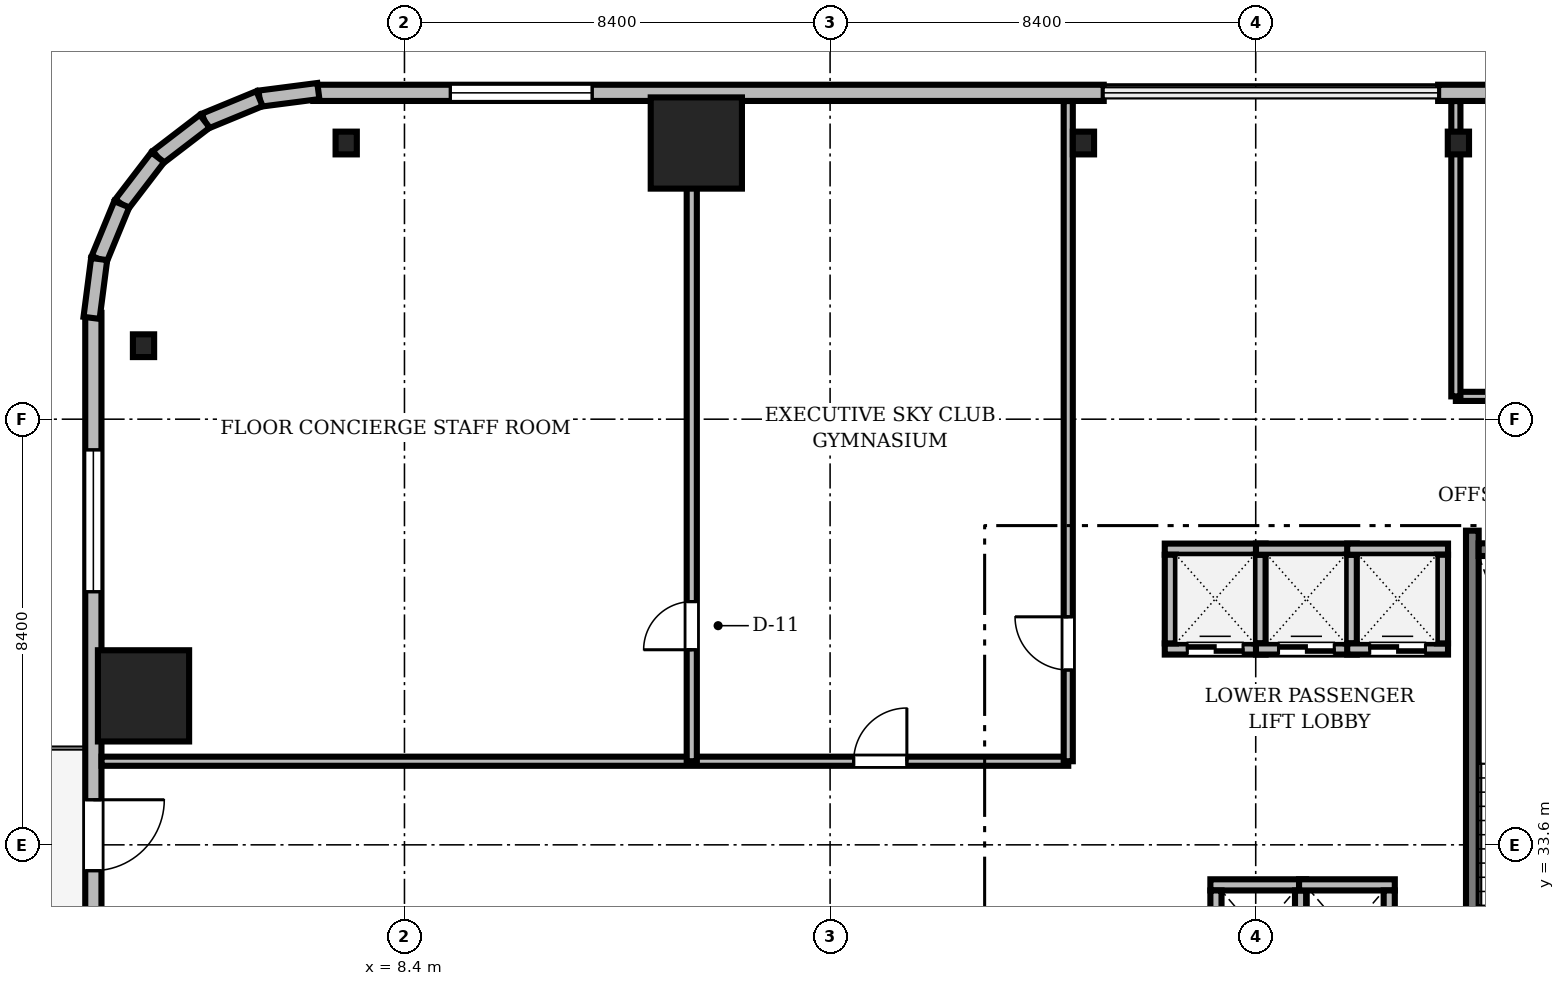
"""IFC4 building model, lengths in metres.
Left out: names, types, materials, properties, quantities, classifications, styles, units other than length and angle.
Written with IfcOpenShell. Run it as: python <this file> out.ifc"""

import sys

from ifc_helpers import new_model, si_unit, direction, frame, frame_2d, origin, origin_2d, place, context, subcontext, project, spatial, rectangle, i_section, extrude, source, transform, mapped, element, fill, save


model = new_model("IFC4")
c1 = context("Model", 3, precision=1e-05, world=origin(), true_north=direction((0.0, 1.0)))
c2 = subcontext(c1, "Body", "Model", "MODEL_VIEW")
j1 = project(units=[si_unit("LENGTHUNIT", "METRE"), si_unit("PLANEANGLEUNIT", "RADIAN")], contexts=[c1])
p1 = place(None, origin())
s1 = spatial("IfcSite", under=j1, at=p1, CompositionType="ELEMENT")
p2 = place(p1, origin())
s2 = spatial("IfcBuilding", under=s1, at=p2, CompositionType="ELEMENT")
p3 = place(p2, frame((0.0, 0.0, 56.8)))
s3 = spatial("IfcBuildingStorey", under=s2, at=p3, CompositionType="ELEMENT", Elevation=56.8)
m1 = source(origin(), c2, "Body", "SweptSolid", [
    extrude(rectangle(XDim=1.8, YDim=1.8, at=origin_2d()), origin(), (0.0, 0.0, 1.0), 3.41),
])
for number, where, z_axis, x_axis in (
    (1, (14.16, 47.45, 0.0), (0.0, 0.0, 1.0), (1.0, 0.0, 0.0)),
    (2, (3.25, 36.54, 0.0), (0.0, 0.0, 1.0), (1.0, 0.0, 0.0)),
):
    element("IfcColumn", number, at=place(p3, frame(where, z_axis=z_axis, x_axis=x_axis)), inside=s3, PredefinedType="COLUMN", context=c2, shape_type="MappedRepresentation", body=[
        mapped(m1, transform((0.0, 0.0, 0.0), scale=1.0)),
    ])
m2 = source(origin(), c2, "Body", "SweptSolid", [
    extrude(i_section(OverallWidth=0.419, OverallDepth=0.449, WebThickness=0.031, FlangeThickness=0.048, FilletRadius=0.015, at=origin_2d()), origin(), (0.0, 0.0, 1.0), 3.41),
])
for number, where, z_axis, x_axis in (
    (3, (29.2, 47.45, 0.0), (0.0, 0.0, 1.0), (1.0, 0.0, 0.0)),
    (4, (21.8, 47.45, 0.0), (0.0, 0.0, 1.0), (1.0, 0.0, 0.0)),
    (5, (7.25, 47.45, 0.0), (0.0, 0.0, 1.0), (1.0, 0.0, 0.0)),
    (6, (3.25, 43.45, 0.0), (0.0, 0.0, 1.0), (1.0, 0.0, 0.0)),
):
    element("IfcColumn", number, at=place(p3, frame(where, z_axis=z_axis, x_axis=x_axis)), inside=s3, PredefinedType="COLUMN", context=c2, shape_type="MappedRepresentation", body=[
        mapped(m2, transform((0.0, 0.0, 0.0), scale=1.0)),
    ])
m3 = source(origin(), c2, "Body", "SweptSolid", [
    extrude(rectangle(XDim=15.6, YDim=0.32, at=frame_2d((7.8, 0.0))), origin(), (0.0, 0.0, 1.0), 3.41),
])
p4 = place(p3, frame((44.4, 48.44, 0.0), z_axis=(0.0, 0.0, 1.0), x_axis=(-1.0, 0.0, 0.0)))
e7 = element("IfcWall", 7, at=p4, inside=s3, PredefinedType="SOLIDWALL", context=c2, shape_type="MappedRepresentation", body=[
    mapped(m3, transform((0.0, 0.0, 0.0), scale=1.0)),
])
m4 = source(origin(), c2, "Body", "SweptSolid", [
    extrude(rectangle(XDim=1.4, YDim=2.3, at=frame_2d((0.7, 1.15))), frame((0.0, 0.17, 0.0), z_axis=(0.0, -1.0, 0.0), x_axis=(1.0, 0.0, 0.0)), (0.0, 0.0, 1.0), 0.34),
])
p5 = place(p4, frame((9.61, 0.0, 0.0)))
e8 = element("IfcOpeningElement", 8, at=p5, cuts=e7, PredefinedType="OPENING", context=c2, shape_type="MappedRepresentation", body=[
    mapped(m4, transform((0.0, 0.0, 0.0), scale=1.0)),
])
m5 = source(origin(), c2, "Body", "SweptSolid", [
    extrude(rectangle(XDim=2.8, YDim=2.4, at=frame_2d((1.4, 1.2))), frame((0.0, 0.17, 0.0), z_axis=(0.0, -1.0, 0.0), x_axis=(1.0, 0.0, 0.0)), (0.0, 0.0, 1.0), 0.34),
])
p6 = place(p4, frame((2.705, 0.0, 0.72)))
e9 = element("IfcOpeningElement", 9, at=p6, cuts=e7, PredefinedType="OPENING", context=c2, shape_type="MappedRepresentation", body=[
    mapped(m5, transform((0.0, 0.0, 0.0), scale=1.0)),
])
p7 = place(p3, frame((22.2, 48.44, 0.0), z_axis=(0.0, 0.0, 1.0), x_axis=(-1.0, 0.0, 0.0)))
e10 = element("IfcWall", 10, at=p7, inside=s3, PredefinedType="SOLIDWALL", context=c2, shape_type="MappedRepresentation", body=[
    mapped(m3, transform((0.0, 0.0, 0.0), scale=1.0)),
])
p8 = place(p7, frame((10.095, 0.0, 0.72)))
e11 = element("IfcOpeningElement", 11, at=p8, cuts=e10, PredefinedType="OPENING", context=c2, shape_type="MappedRepresentation", body=[
    mapped(m5, transform((0.0, 0.0, 0.0), scale=1.0)),
])
m6 = source(origin(), c2, "Body", "SweptSolid", [
    extrude(rectangle(XDim=15.6, YDim=0.32, at=frame_2d((7.8, 0.0))), origin(), (0.0, 0.0, 1.0), 3.41),
])
p9 = place(p3, frame((2.26, 44.1, 0.0), z_axis=(0.0, 0.0, 1.0), x_axis=(0.0, -1.0, 0.0)))
e12 = element("IfcWall", 12, at=p9, inside=s3, PredefinedType="SOLIDWALL", context=c2, shape_type="MappedRepresentation", body=[
    mapped(m6, transform((0.0, 0.0, 0.0), scale=1.0)),
])
p10 = place(p9, frame((9.61, 0.0, 0.0)))
e13 = element("IfcOpeningElement", 13, at=p10, cuts=e12, PredefinedType="OPENING", context=c2, shape_type="MappedRepresentation", body=[
    mapped(m4, transform((0.0, 0.0, 0.0), scale=1.0)),
])
p11 = place(p9, frame((2.705, 0.0, 0.72)))
e14 = element("IfcOpeningElement", 14, at=p11, cuts=e12, PredefinedType="OPENING", context=c2, shape_type="MappedRepresentation", body=[
    mapped(m5, transform((0.0, 0.0, 0.0), scale=1.0)),
])
m7 = source(origin(), c2, "Body", "SweptSolid", [
    extrude(rectangle(XDim=1.17, YDim=0.32, at=frame_2d((0.585, 0.0))), origin(), (0.0, 0.0, 1.0), 3.41),
])
p12 = place(p3, frame((6.7, 48.476, 0.0), z_axis=(0.0, 0.0, 1.0), x_axis=(-0.991735963317, -0.128295670475, 0.0)))
e15 = element("IfcWall", 15, at=p12, inside=s3, PredefinedType="SOLIDWALL", context=c2, shape_type="MappedRepresentation", body=[
    mapped(m7, transform((0.0, 0.0, 0.0), scale=1.0)),
])
m8 = source(origin(), c2, "Body", "SweptSolid", [
    extrude(rectangle(XDim=1.169, YDim=0.32, at=frame_2d((0.584, 0.0))), origin(), (0.0, 0.0, 1.0), 3.41),
])
p13 = place(p3, frame((5.54, 48.325, 0.0), z_axis=(0.0, 0.0, 1.0), x_axis=(-0.924552646638, -0.381054331552, 0.0)))
e16 = element("IfcWall", 16, at=p13, inside=s3, PredefinedType="SOLIDWALL", context=c2, shape_type="MappedRepresentation", body=[
    mapped(m8, transform((0.0, 0.0, 0.0), scale=1.0)),
])
m9 = source(origin(), c2, "Body", "SweptSolid", [
    extrude(rectangle(XDim=1.169, YDim=0.32, at=frame_2d((0.584, 0.0))), origin(), (0.0, 0.0, 1.0), 3.41),
])
p14 = place(p3, frame((4.459, 47.88, 0.0), z_axis=(0.0, 0.0, 1.0), x_axis=(-0.793663520347, -0.608356981114, 0.0)))
e17 = element("IfcWall", 17, at=p14, inside=s3, PredefinedType="SOLIDWALL", context=c2, shape_type="MappedRepresentation", body=[
    mapped(m9, transform((0.0, 0.0, 0.0), scale=1.0)),
])
m10 = source(origin(), c2, "Body", "SweptSolid", [
    extrude(rectangle(XDim=1.169, YDim=0.32, at=frame_2d((0.584, 0.0))), origin(), (0.0, 0.0, 1.0), 3.41),
])
p15 = place(p3, frame((3.531, 47.169, 0.0), z_axis=(0.0, 0.0, 1.0), x_axis=(-0.608387696831, -0.793639975269, 0.0)))
e18 = element("IfcWall", 18, at=p15, inside=s3, PredefinedType="SOLIDWALL", context=c2, shape_type="MappedRepresentation", body=[
    mapped(m10, transform((0.0, 0.0, 0.0), scale=1.0)),
])
p16 = place(p3, frame((2.82, 46.241, 0.0), z_axis=(0.0, 0.0, 1.0), x_axis=(-0.381054331552, -0.924552646638, 0.0)))
e19 = element("IfcWall", 19, at=p16, inside=s3, PredefinedType="SOLIDWALL", context=c2, shape_type="MappedRepresentation", body=[
    mapped(m8, transform((0.0, 0.0, 0.0), scale=1.0)),
])
p17 = place(p3, frame((2.375, 45.16, 0.0), z_axis=(0.0, 0.0, 1.0), x_axis=(-0.128295670475, -0.991735963317, 0.0)))
e20 = element("IfcWall", 20, at=p17, inside=s3, PredefinedType="SOLIDWALL", context=c2, shape_type="MappedRepresentation", body=[
    mapped(m7, transform((0.0, 0.0, 0.0), scale=1.0)),
])
m11 = source(origin(), c2, "Body", "SweptSolid", [
    extrude(rectangle(XDim=9.15, YDim=0.25, at=frame_2d((4.575, 0.0))), origin(), (0.0, 0.0, 1.0), 3.45),
])
p18 = place(p3, frame((29.475, 30.65, 0.0), z_axis=(0.0, 0.0, 1.0), x_axis=(0.0, 1.0, 0.0)))
e21 = element("IfcWall", 21, at=p18, inside=s3, PredefinedType="SOLIDWALL", context=c2, shape_type="MappedRepresentation", body=[
    mapped(m11, transform((0.0, 0.0, 0.0), scale=1.0)),
])
m12 = source(origin(), c2, "Body", "SweptSolid", [
    extrude(rectangle(XDim=3.15, YDim=0.25, at=frame_2d((1.575, 0.0))), origin(), (0.0, 0.0, 1.0), 3.45),
])
p19 = place(p3, frame((29.6, 39.425, 0.0), z_axis=(0.0, 0.0, 1.0), x_axis=(1.0, 0.0, 0.0)))
e22 = element("IfcWall", 22, at=p19, inside=s3, PredefinedType="SOLIDWALL", context=c2, shape_type="MappedRepresentation", body=[
    mapped(m12, transform((0.0, 0.0, 0.0), scale=1.0)),
])
m13 = source(origin(), c2, "Body", "SweptSolid", [
    extrude(rectangle(XDim=1.99, YDim=0.22, at=frame_2d((0.995, 0.0))), origin(), (0.0, 0.0, 1.0), 3.41),
])
p20 = place(p3, frame((23.405, 37.465, 0.0), z_axis=(0.0, 0.0, 1.0), x_axis=(1.0, 0.0, 0.0)))
e23 = element("IfcWall", 23, at=p20, inside=s3, PredefinedType="SOLIDWALL", context=c2, shape_type="MappedRepresentation", body=[
    mapped(m13, transform((0.0, 0.0, 0.0), scale=1.0)),
])
m14 = source(origin(), c2, "Body", "SweptSolid", [
    extrude(rectangle(XDim=1.1, YDim=2.2, at=frame_2d((0.55, 1.1))), frame((0.0, 0.12, 0.0), z_axis=(0.0, -1.0, 0.0), x_axis=(1.0, 0.0, 0.0)), (0.0, 0.0, 1.0), 0.24),
])
p21 = place(p20, frame((0.445, 0.0, 0.0)))
e24 = element("IfcOpeningElement", 24, at=p21, cuts=e23, PredefinedType="OPENING", context=c2, shape_type="MappedRepresentation", body=[
    mapped(m14, transform((0.0, 0.0, 0.0), scale=1.0)),
])
p22 = place(p3, frame((23.405, 39.435, 0.0), z_axis=(0.0, 0.0, 1.0), x_axis=(1.0, 0.0, 0.0)))
e25 = element("IfcWall", 25, at=p22, inside=s3, PredefinedType="SOLIDWALL", context=c2, shape_type="MappedRepresentation", body=[
    mapped(m13, transform((0.0, 0.0, 0.0), scale=1.0)),
])
m15 = source(origin(), c2, "Body", "SweptSolid", [
    extrude(rectangle(XDim=1.75, YDim=0.22, at=frame_2d((0.875, 0.0))), origin(), (0.0, 0.0, 1.0), 3.41),
])
for number, where, z_axis, x_axis in (
    (26, (23.515, 37.575, 0.0), (0.0, 0.0, 1.0), (0.0, 1.0, 0.0)),
    (27, (25.285, 37.575, 0.0), (0.0, 0.0, 1.0), (0.0, 1.0, 0.0)),
):
    element("IfcWall", number, at=place(p3, frame(where, z_axis=z_axis, x_axis=x_axis)), inside=s3, PredefinedType="SOLIDWALL", context=c2, shape_type="MappedRepresentation", body=[
        mapped(m15, transform((0.0, 0.0, 0.0), scale=1.0)),
    ])
p23 = place(p3, frame((25.205, 37.465, 0.0), z_axis=(0.0, 0.0, 1.0), x_axis=(1.0, 0.0, 0.0)))
e28 = element("IfcWall", 28, at=p23, inside=s3, PredefinedType="SOLIDWALL", context=c2, shape_type="MappedRepresentation", body=[
    mapped(m13, transform((0.0, 0.0, 0.0), scale=1.0)),
])
p24 = place(p23, frame((0.445, 0.0, 0.0)))
e29 = element("IfcOpeningElement", 29, at=p24, cuts=e28, PredefinedType="OPENING", context=c2, shape_type="MappedRepresentation", body=[
    mapped(m14, transform((0.0, 0.0, 0.0), scale=1.0)),
])
p25 = place(p3, frame((25.205, 39.435, 0.0), z_axis=(0.0, 0.0, 1.0), x_axis=(1.0, 0.0, 0.0)))
e30 = element("IfcWall", 30, at=p25, inside=s3, PredefinedType="SOLIDWALL", context=c2, shape_type="MappedRepresentation", body=[
    mapped(m13, transform((0.0, 0.0, 0.0), scale=1.0)),
])
p26 = place(p3, frame((27.085, 37.575, 0.0), z_axis=(0.0, 0.0, 1.0), x_axis=(0.0, 1.0, 0.0)))
e31 = element("IfcWall", 31, at=p26, inside=s3, PredefinedType="SOLIDWALL", context=c2, shape_type="MappedRepresentation", body=[
    mapped(m15, transform((0.0, 0.0, 0.0), scale=1.0)),
])
m16 = source(origin(), c2, "Body", "SweptSolid", [
    extrude(rectangle(XDim=1.99, YDim=0.22, at=frame_2d((0.995, 0.0))), origin(), (0.0, 0.0, 1.0), 3.41),
])
p27 = place(p3, frame((27.005, 37.465, 0.0), z_axis=(0.0, 0.0, 1.0), x_axis=(1.0, 0.0, 0.0)))
e32 = element("IfcWall", 32, at=p27, inside=s3, PredefinedType="SOLIDWALL", context=c2, shape_type="MappedRepresentation", body=[
    mapped(m16, transform((0.0, 0.0, 0.0), scale=1.0)),
])
p28 = place(p27, frame((0.445, 0.0, 0.0)))
e33 = element("IfcOpeningElement", 33, at=p28, cuts=e32, PredefinedType="OPENING", context=c2, shape_type="MappedRepresentation", body=[
    mapped(m14, transform((0.0, 0.0, 0.0), scale=1.0)),
])
p29 = place(p3, frame((27.005, 39.435, 0.0), z_axis=(0.0, 0.0, 1.0), x_axis=(1.0, 0.0, 0.0)))
e34 = element("IfcWall", 34, at=p29, inside=s3, PredefinedType="SOLIDWALL", context=c2, shape_type="MappedRepresentation", body=[
    mapped(m16, transform((0.0, 0.0, 0.0), scale=1.0)),
])
p30 = place(p3, frame((28.885, 37.575, 0.0), z_axis=(0.0, 0.0, 1.0), x_axis=(0.0, 1.0, 0.0)))
e35 = element("IfcWall", 35, at=p30, inside=s3, PredefinedType="SOLIDWALL", context=c2, shape_type="MappedRepresentation", body=[
    mapped(m15, transform((0.0, 0.0, 0.0), scale=1.0)),
])
m17 = source(origin(), c2, "Body", "SweptSolid", [
    extrude(rectangle(XDim=1.89, YDim=0.22, at=frame_2d((0.945, 0.0))), origin(), (0.0, 0.0, 1.0), 3.41),
])
p31 = place(p3, frame((24.305, 32.81, 0.0), z_axis=(0.0, 0.0, 1.0), x_axis=(1.0, 0.0, 0.0)))
e36 = element("IfcWall", 36, at=p31, inside=s3, PredefinedType="SOLIDWALL", context=c2, shape_type="MappedRepresentation", body=[
    mapped(m17, transform((0.0, 0.0, 0.0), scale=1.0)),
])
m18 = source(origin(), c2, "Body", "SweptSolid", [
    extrude(rectangle(XDim=1.7, YDim=0.22, at=frame_2d((0.85, 0.0))), origin(), (0.0, 0.0, 1.0), 3.41),
])
for number, where, z_axis, x_axis in (
    (37, (24.415, 31.0, 0.0), (0.0, 0.0, 1.0), (0.0, 1.0, 0.0)),
    (38, (26.085, 31.0, 0.0), (0.0, 0.0, 1.0), (0.0, 1.0, 0.0)),
):
    element("IfcWall", number, at=place(p3, frame(where, z_axis=z_axis, x_axis=x_axis)), inside=s3, PredefinedType="SOLIDWALL", context=c2, shape_type="MappedRepresentation", body=[
        mapped(m18, transform((0.0, 0.0, 0.0), scale=1.0)),
    ])
p32 = place(p3, frame((26.055, 32.81, 0.0), z_axis=(0.0, 0.0, 1.0), x_axis=(1.0, 0.0, 0.0)))
e39 = element("IfcWall", 39, at=p32, inside=s3, PredefinedType="SOLIDWALL", context=c2, shape_type="MappedRepresentation", body=[
    mapped(m17, transform((0.0, 0.0, 0.0), scale=1.0)),
])
p33 = place(p3, frame((27.835, 31.0, 0.0), z_axis=(0.0, 0.0, 1.0), x_axis=(0.0, 1.0, 0.0)))
e40 = element("IfcWall", 40, at=p33, inside=s3, PredefinedType="SOLIDWALL", context=c2, shape_type="MappedRepresentation", body=[
    mapped(m18, transform((0.0, 0.0, 0.0), scale=1.0)),
])
m19 = source(origin(), c2, "Body", "SweptSolid", [
    extrude(rectangle(XDim=19.428, YDim=0.18, at=frame_2d((9.714, 0.0))), origin(), (0.0, 0.0, 1.0), 2.652),
])
p34 = place(p3, frame((29.15, 42.45, 0.0), z_axis=(0.0, 0.0, 1.0), x_axis=(1.0, 0.0, 0.0)))
e41 = element("IfcWall", 41, at=p34, inside=s3, PredefinedType="PARTITIONING", context=c2, shape_type="MappedRepresentation", body=[
    mapped(m19, transform((0.0, 0.0, 0.0), scale=1.0)),
])
m20 = source(origin(), c2, "Body", "SweptSolid", [
    extrude(rectangle(XDim=1.05, YDim=2.2, at=frame_2d((0.525, 1.1))), frame((0.0, 0.1, 0.0), z_axis=(0.0, -1.0, 0.0), x_axis=(1.0, 0.0, 0.0)), (0.0, 0.0, 1.0), 0.2),
])
p35 = place(p34, frame((4.5, 0.0, 0.0)))
e42 = element("IfcOpeningElement", 42, at=p35, cuts=e41, PredefinedType="OPENING", context=c2, shape_type="MappedRepresentation", body=[
    mapped(m20, transform((0.0, 0.0, 0.0), scale=1.0)),
])
m21 = source(origin(), c2, "Body", "SweptSolid", [
    extrude(rectangle(XDim=19.078, YDim=0.18, at=frame_2d((9.539, 0.0))), origin(), (0.0, 0.0, 1.0), 2.652),
])
p36 = place(p3, frame((2.422, 35.25, 0.0), z_axis=(0.0, 0.0, 1.0), x_axis=(1.0, 0.0, 0.0)))
e43 = element("IfcWall", 43, at=p36, inside=s3, PredefinedType="PARTITIONING", context=c2, shape_type="MappedRepresentation", body=[
    mapped(m21, transform((0.0, 0.0, 0.0), scale=1.0)),
])
p37 = place(p36, frame((14.843, 0.0, 0.0)))
e44 = element("IfcOpeningElement", 44, at=p37, cuts=e43, PredefinedType="OPENING", context=c2, shape_type="MappedRepresentation", body=[
    mapped(m20, transform((0.0, 0.0, 0.0), scale=1.0)),
])
m22 = source(origin(), c2, "Body", "SweptSolid", [
    extrude(rectangle(XDim=13.028, YDim=0.2, at=frame_2d((6.514, 0.0))), origin(), (0.0, 0.0, 1.0), 2.652),
])
p38 = place(p3, frame((14.07, 35.25, 0.0), z_axis=(0.0, 0.0, 1.0), x_axis=(0.0, 1.0, 0.0)))
e45 = element("IfcWall", 45, at=p38, inside=s3, PredefinedType="PARTITIONING", context=c2, shape_type="MappedRepresentation", body=[
    mapped(m22, transform((0.0, 0.0, 0.0), scale=1.0)),
])
m23 = source(origin(), c2, "Body", "SweptSolid", [
    extrude(rectangle(XDim=0.95, YDim=2.15, at=frame_2d((0.475, 1.075))), frame((0.0, 0.11, 0.0), z_axis=(0.0, -1.0, 0.0), x_axis=(1.0, 0.0, 0.0)), (0.0, 0.0, 1.0), 0.22),
])
p39 = place(p38, frame((2.2, 0.0, 0.0)))
e46 = element("IfcOpeningElement", 46, at=p39, cuts=e45, PredefinedType="OPENING", context=c2, shape_type="MappedRepresentation", body=[
    mapped(m23, transform((0.0, 0.0, 0.0), scale=1.0)),
])
m24 = source(origin(), c2, "Body", "SweptSolid", [
    extrude(rectangle(XDim=13.028, YDim=0.18, at=frame_2d((6.514, 0.0))), origin(), (0.0, 0.0, 1.0), 2.652),
])
p40 = place(p3, frame((21.5, 35.25, 0.0), z_axis=(0.0, 0.0, 1.0), x_axis=(0.0, 1.0, 0.0)))
e47 = element("IfcWall", 47, at=p40, inside=s3, PredefinedType="PARTITIONING", context=c2, shape_type="MappedRepresentation", body=[
    mapped(m24, transform((0.0, 0.0, 0.0), scale=1.0)),
])
p41 = place(p40, frame((1.8, 0.0, 0.0)))
e48 = element("IfcOpeningElement", 48, at=p41, cuts=e47, PredefinedType="OPENING", context=c2, shape_type="MappedRepresentation", body=[
    mapped(m20, transform((0.0, 0.0, 0.0), scale=1.0)),
])
m25 = source(origin(), c2, "Body", "SweptSolid", [
    extrude(rectangle(XDim=5.828, YDim=0.18, at=frame_2d((2.914, 0.0))), origin(), (0.0, 0.0, 1.0), 2.652),
])
p42 = place(p3, frame((29.15, 42.45, 0.0), z_axis=(0.0, 0.0, 1.0), x_axis=(0.0, 1.0, 0.0)))
e49 = element("IfcWall", 49, at=p42, inside=s3, PredefinedType="PARTITIONING", context=c2, shape_type="MappedRepresentation", body=[
    mapped(m25, transform((0.0, 0.0, 0.0), scale=1.0)),
])
m26 = source(origin(), c2, "Body", "SweptSolid", [
    extrude(rectangle(XDim=2.8, YDim=2.4, at=frame_2d((1.4, 1.2))), frame((0.0, 0.03, 0.0), z_axis=(0.0, -1.0, 0.0), x_axis=(1.0, 0.0, 0.0)), (0.0, 0.0, 1.0), 0.06),
])
p43 = place(p8, origin())
e50 = element("IfcWindow", 50, at=p43, inside=s3, PartitioningType="SINGLE_PANEL", PredefinedType="WINDOW", context=c2, shape_type="MappedRepresentation", body=[
    mapped(m26, transform((0.0, 0.0, 0.0), scale=1.0)),
])
fill(e11, e50)
m27 = source(origin(), c2, "Body", "SweptSolid", [
    extrude(rectangle(XDim=1.4, YDim=2.3, at=frame_2d((0.7, 1.15))), frame((0.0, 0.025, 0.0), z_axis=(0.0, -1.0, 0.0), x_axis=(1.0, 0.0, 0.0)), (0.0, 0.0, 1.0), 0.05),
])
p44 = place(p10, frame((1.4, 0.0, 0.0), z_axis=(0.0, 0.0, 1.0), x_axis=(-1.0, 0.0, 0.0)))
e51 = element("IfcDoor", 51, at=p44, inside=s3, OperationType="DOUBLE_DOOR_SLIDING", PredefinedType="DOOR", context=c2, shape_type="MappedRepresentation", body=[
    mapped(m27, transform((0.0, 0.0, 0.0), scale=1.0)),
])
fill(e13, e51)
p45 = place(p11, origin())
e52 = element("IfcWindow", 52, at=p45, inside=s3, PartitioningType="SINGLE_PANEL", PredefinedType="WINDOW", context=c2, shape_type="MappedRepresentation", body=[
    mapped(m26, transform((0.0, 0.0, 0.0), scale=1.0)),
])
fill(e14, e52)
m28 = source(origin(), c2, "Body", "SweptSolid", [
    extrude(rectangle(XDim=1.1, YDim=2.2, at=frame_2d((0.55, 1.1))), frame((0.0, 0.025, 0.0), z_axis=(0.0, -1.0, 0.0), x_axis=(1.0, 0.0, 0.0)), (0.0, 0.0, 1.0), 0.05),
])
p46 = place(p21, origin())
e53 = element("IfcDoor", 53, at=p46, inside=s3, OperationType="DOUBLE_DOOR_SLIDING", PredefinedType="DOOR", context=c2, shape_type="MappedRepresentation", body=[
    mapped(m28, transform((0.0, 0.0, 0.0), scale=1.0)),
])
fill(e24, e53)
p47 = place(p24, origin())
e54 = element("IfcDoor", 54, at=p47, inside=s3, OperationType="DOUBLE_DOOR_SLIDING", PredefinedType="DOOR", context=c2, shape_type="MappedRepresentation", body=[
    mapped(m28, transform((0.0, 0.0, 0.0), scale=1.0)),
])
fill(e29, e54)
p48 = place(p28, origin())
e55 = element("IfcDoor", 55, at=p48, inside=s3, OperationType="DOUBLE_DOOR_SLIDING", PredefinedType="DOOR", context=c2, shape_type="MappedRepresentation", body=[
    mapped(m28, transform((0.0, 0.0, 0.0), scale=1.0)),
])
fill(e33, e55)
m29 = source(origin(), c2, "Body", "SweptSolid", [
    extrude(rectangle(XDim=1.05, YDim=2.2, at=frame_2d((0.525, 1.1))), frame((0.0, 0.025, 0.0), z_axis=(0.0, -1.0, 0.0), x_axis=(1.0, 0.0, 0.0)), (0.0, 0.0, 1.0), 0.05),
])
p49 = place(p37, origin())
e56 = element("IfcDoor", 56, at=p49, inside=s3, OperationType="SINGLE_SWING_RIGHT", PredefinedType="DOOR", context=c2, shape_type="MappedRepresentation", body=[
    mapped(m29, transform((0.0, 0.0, 0.0), scale=1.0)),
])
fill(e44, e56)
m30 = source(origin(), c2, "Body", "SweptSolid", [
    extrude(rectangle(XDim=0.95, YDim=2.15, at=frame_2d((0.475, 1.075))), frame((0.0, 0.025, 0.0), z_axis=(0.0, -1.0, 0.0), x_axis=(1.0, 0.0, 0.0)), (0.0, 0.0, 1.0), 0.05),
])
p50 = place(p39, origin())
e57 = element("IfcDoor", 57, at=p50, inside=s3, OperationType="SINGLE_SWING_LEFT", PredefinedType="DOOR", context=c2, shape_type="MappedRepresentation", body=[
    mapped(m30, transform((0.0, 0.0, 0.0), scale=1.0)),
])
fill(e46, e57)
p51 = place(p41, origin())
e58 = element("IfcDoor", 58, at=p51, inside=s3, OperationType="SINGLE_SWING_RIGHT", PredefinedType="DOOR", context=c2, shape_type="MappedRepresentation", body=[
    mapped(m29, transform((0.0, 0.0, 0.0), scale=1.0)),
])
fill(e48, e58)
save(model, sys.argv[1])
